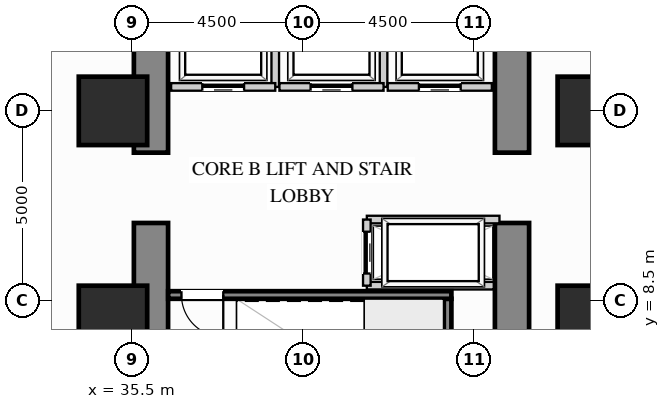
"""IFC4 building model, lengths in metres.
Left out: names, types, materials, properties, quantities, classifications, styles, units other than length and angle.
Written with IfcOpenShell. Run it as: python <this file> out.ifc"""

import sys

from ifc_helpers import new_model, si_unit, direction, frame, frame_2d, origin, origin_2d, place, context, subcontext, project, spatial, rectangle, extrude, source, transform, mapped, element, fill, save


model = new_model("IFC4")
c1 = context("Model", 3, precision=1e-05, world=origin(), true_north=direction((0.0, 1.0)))
c2 = subcontext(c1, "Body", "Model", "MODEL_VIEW")
j1 = project(units=[si_unit("LENGTHUNIT", "METRE"), si_unit("PLANEANGLEUNIT", "RADIAN")], contexts=[c1])
p1 = place(None, origin())
s1 = spatial("IfcSite", under=j1, at=p1, CompositionType="ELEMENT")
p2 = place(p1, origin())
s2 = spatial("IfcBuilding", under=s1, at=p2, CompositionType="ELEMENT")
p3 = place(p2, origin())
s3 = spatial("IfcBuildingStorey", under=s2, at=p3, CompositionType="ELEMENT", Elevation=0.0)
m1 = source(origin(), c2, "Body", "SweptSolid", [
    extrude(rectangle(XDim=1.8, YDim=1.8, at=origin_2d()), origin(), (0.0, 0.0, 1.0), 4.25),
])
for number, where, z_axis, x_axis in (
    (1, (47.6, 8.0, 0.0), (0.0, 0.0, 1.0), (1.0, 0.0, 0.0)),
    (2, (47.6, 13.5, 0.0), (0.0, 0.0, 1.0), (1.0, 0.0, 0.0)),
    (3, (35.0, 8.0, 0.0), (0.0, 0.0, 1.0), (1.0, 0.0, 0.0)),
    (4, (35.0, 13.5, 0.0), (0.0, 0.0, 1.0), (1.0, 0.0, 0.0)),
):
    element("IfcColumn", number, at=place(p3, frame(where, z_axis=z_axis, x_axis=x_axis)), inside=s3, PredefinedType="COLUMN", context=c2, shape_type="MappedRepresentation", body=[
        mapped(m1, transform((0.0, 0.0, 0.0), x_axis=(1.0, 0.0, 0.0), y_axis=(0.0, 1.0, 0.0), z_axis=(0.0, 0.0, 1.0))),
    ])
m2 = source(origin(), c2, "Body", "SweptSolid", [
    extrude(rectangle(XDim=5.6, YDim=0.9, at=frame_2d((2.8, 0.0))), origin(), (0.0, 0.0, 1.0), 4.25),
])
p4 = place(p3, frame((45.5, 4.95, 0.0), z_axis=(0.0, 0.0, 1.0), x_axis=(0.0, 1.0, 0.0)))
e5 = element("IfcWall", 5, at=p4, inside=s3, PredefinedType="SHEAR", context=c2, shape_type="MappedRepresentation", body=[
    mapped(m2, transform((0.0, 0.0, 0.0), x_axis=(1.0, 0.0, 0.0), y_axis=(0.0, 1.0, 0.0), z_axis=(0.0, 0.0, 1.0))),
])
m3 = source(origin(), c2, "Body", "SweptSolid", [
    extrude(rectangle(XDim=3.65, YDim=0.9, at=frame_2d((1.825, 0.0))), origin(), (0.0, 0.0, 1.0), 4.25),
])
p5 = place(p3, frame((45.5, 12.4, 0.0), z_axis=(0.0, 0.0, 1.0), x_axis=(0.0, 1.0, 0.0)))
e6 = element("IfcWall", 6, at=p5, inside=s3, PredefinedType="SHEAR", context=c2, shape_type="MappedRepresentation", body=[
    mapped(m3, transform((0.0, 0.0, 0.0), x_axis=(1.0, 0.0, 0.0), y_axis=(0.0, 1.0, 0.0), z_axis=(0.0, 0.0, 1.0))),
])
p6 = place(p3, frame((36.0, 4.95, 0.0), z_axis=(0.0, 0.0, 1.0), x_axis=(0.0, 1.0, 0.0)))
e7 = element("IfcWall", 7, at=p6, inside=s3, PredefinedType="SHEAR", context=c2, shape_type="MappedRepresentation", body=[
    mapped(m2, transform((0.0, 0.0, 0.0), x_axis=(1.0, 0.0, 0.0), y_axis=(0.0, 1.0, 0.0), z_axis=(0.0, 0.0, 1.0))),
])
p7 = place(p3, frame((36.0, 12.4, 0.0), z_axis=(0.0, 0.0, 1.0), x_axis=(0.0, 1.0, 0.0)))
e8 = element("IfcWall", 8, at=p7, inside=s3, PredefinedType="SHEAR", context=c2, shape_type="MappedRepresentation", body=[
    mapped(m3, transform((0.0, 0.0, 0.0), x_axis=(1.0, 0.0, 0.0), y_axis=(0.0, 1.0, 0.0), z_axis=(0.0, 0.0, 1.0))),
])
m4 = source(origin(), c2, "Body", "SweptSolid", [
    extrude(rectangle(XDim=1.89, YDim=0.2, at=frame_2d((0.945, 0.0))), origin(), (0.0, 0.0, 1.0), 4.235),
])
p8 = place(p3, frame((39.27, 14.13, 0.0), z_axis=(0.0, 0.0, 1.0), x_axis=(0.0, 1.0, 0.0)))
e9 = element("IfcWall", 9, at=p8, inside=s3, PredefinedType="PARTITIONING", context=c2, shape_type="MappedRepresentation", body=[
    mapped(m4, transform((0.0, 0.0, 0.0), x_axis=(1.0, 0.0, 0.0), y_axis=(0.0, 1.0, 0.0), z_axis=(0.0, 0.0, 1.0))),
])
p9 = place(p3, frame((36.53, 14.13, 0.0), z_axis=(0.0, 0.0, 1.0), x_axis=(1.0, 0.0, 0.0)))
e10 = element("IfcWall", 10, at=p9, inside=s3, PredefinedType="PARTITIONING", context=c2, shape_type="SweptSolid", body=[
    extrude(rectangle(XDim=2.74, YDim=0.2, at=frame_2d((1.37, 0.0))), origin(), (0.0, 0.0, 1.0), 4.235),
])
p10 = place(p9, frame((0.82, 0.0, 0.0)))
e11 = element("IfcOpeningElement", 11, at=p10, cuts=e10, PredefinedType="OPENING", context=c2, shape_type="SweptSolid", body=[
    extrude(rectangle(XDim=1.1, YDim=2.2, at=frame_2d((0.55, 1.1))), frame((0.0, 0.11, 0.0), z_axis=(0.0, -1.0, 0.0), x_axis=(1.0, 0.0, 0.0)), (0.0, 0.0, 1.0), 0.22),
])
p11 = place(p3, frame((42.12, 14.13, 0.0), z_axis=(0.0, 0.0, 1.0), x_axis=(0.0, 1.0, 0.0)))
e12 = element("IfcWall", 12, at=p11, inside=s3, PredefinedType="PARTITIONING", context=c2, shape_type="MappedRepresentation", body=[
    mapped(m4, transform((0.0, 0.0, 0.0), x_axis=(1.0, 0.0, 0.0), y_axis=(0.0, 1.0, 0.0), z_axis=(0.0, 0.0, 1.0))),
])
p12 = place(p3, frame((39.38, 14.13, 0.0), z_axis=(0.0, 0.0, 1.0), x_axis=(1.0, 0.0, 0.0)))
e13 = element("IfcWall", 13, at=p12, inside=s3, PredefinedType="PARTITIONING", context=c2, shape_type="SweptSolid", body=[
    extrude(rectangle(XDim=2.74, YDim=0.2, at=frame_2d((1.37, 0.0))), origin(), (0.0, 0.0, 1.0), 4.235),
])
p13 = place(p12, frame((0.82, 0.0, 0.0)))
e14 = element("IfcOpeningElement", 14, at=p13, cuts=e13, PredefinedType="OPENING", context=c2, shape_type="SweptSolid", body=[
    extrude(rectangle(XDim=1.1, YDim=2.2, at=frame_2d((0.55, 1.1))), frame((0.0, 0.11, 0.0), z_axis=(0.0, -1.0, 0.0), x_axis=(1.0, 0.0, 0.0)), (0.0, 0.0, 1.0), 0.22),
])
p14 = place(p3, frame((42.23, 14.13, 0.0), z_axis=(0.0, 0.0, 1.0), x_axis=(1.0, 0.0, 0.0)))
e15 = element("IfcWall", 15, at=p14, inside=s3, PredefinedType="PARTITIONING", context=c2, shape_type="SweptSolid", body=[
    extrude(rectangle(XDim=2.74, YDim=0.2, at=frame_2d((1.37, 0.0))), origin(), (0.0, 0.0, 1.0), 4.235),
])
p15 = place(p14, frame((0.82, 0.0, 0.0)))
e16 = element("IfcOpeningElement", 16, at=p15, cuts=e15, PredefinedType="OPENING", context=c2, shape_type="SweptSolid", body=[
    extrude(rectangle(XDim=1.1, YDim=2.2, at=frame_2d((0.55, 1.1))), frame((0.0, 0.11, 0.0), z_axis=(0.0, -1.0, 0.0), x_axis=(1.0, 0.0, 0.0)), (0.0, 0.0, 1.0), 0.22),
])
m5 = source(origin(), c2, "Body", "SweptSolid", [
    extrude(rectangle(XDim=3.49, YDim=0.2, at=frame_2d((1.745, 0.0))), origin(), (0.0, 0.0, 1.0), 4.235),
])
p16 = place(p3, frame((41.68, 10.64, 0.0), z_axis=(0.0, 0.0, 1.0), x_axis=(1.0, 0.0, 0.0)))
e17 = element("IfcWall", 17, at=p16, inside=s3, PredefinedType="PARTITIONING", context=c2, shape_type="MappedRepresentation", body=[
    mapped(m5, transform((0.0, 0.0, 0.0), x_axis=(1.0, 0.0, 0.0), y_axis=(0.0, 1.0, 0.0), z_axis=(0.0, 0.0, 1.0))),
])
m6 = source(origin(), c2, "Body", "SweptSolid", [
    extrude(rectangle(XDim=3.34, YDim=0.2, at=frame_2d((1.67, 0.0))), origin(), (0.0, 0.0, 1.0), 4.235),
])
p17 = place(p3, frame((41.68, 8.9, 0.0), z_axis=(0.0, 0.0, 1.0), x_axis=(1.0, 0.0, 0.0)))
e18 = element("IfcWall", 18, at=p17, inside=s3, PredefinedType="PARTITIONING", context=c2, shape_type="MappedRepresentation", body=[
    mapped(m6, transform((0.0, 0.0, 0.0), x_axis=(1.0, 0.0, 0.0), y_axis=(0.0, 1.0, 0.0), z_axis=(0.0, 0.0, 1.0))),
])
p18 = place(p3, frame((41.68, 8.9, 0.0), z_axis=(0.0, 0.0, 1.0), x_axis=(0.0, 1.0, 0.0)))
e19 = element("IfcWall", 19, at=p18, inside=s3, PredefinedType="PARTITIONING", context=c2, shape_type="SweptSolid", body=[
    extrude(rectangle(XDim=1.74, YDim=0.2, at=frame_2d((0.87, 0.0))), origin(), (0.0, 0.0, 1.0), 4.235),
])
p19 = place(p18, frame((0.32, 0.0, 0.0)))
e20 = element("IfcOpeningElement", 20, at=p19, cuts=e19, PredefinedType="OPENING", context=c2, shape_type="SweptSolid", body=[
    extrude(rectangle(XDim=1.1, YDim=2.2, at=frame_2d((0.55, 1.1))), frame((0.0, 0.11, 0.0), z_axis=(0.0, -1.0, 0.0), x_axis=(1.0, 0.0, 0.0)), (0.0, 0.0, 1.0), 0.22),
])
m7 = source(origin(), c2, "Body", "SweptSolid", [
    extrude(rectangle(XDim=3.603, YDim=0.2, at=frame_2d((1.802, 0.0))), origin(), (0.0, 0.0, 1.0), 4.25),
])
p20 = place(p3, frame((43.805, 4.952, 0.0), z_axis=(0.0, 0.0, 1.0), x_axis=(0.0, 1.0, 0.0)))
e21 = element("IfcWall", 21, at=p20, inside=s3, PredefinedType="SHEAR", context=c2, shape_type="MappedRepresentation", body=[
    mapped(m7, transform((0.0, 0.0, 0.0), x_axis=(1.0, 0.0, 0.0), y_axis=(0.0, 1.0, 0.0), z_axis=(0.0, 0.0, 1.0))),
])
p21 = place(p3, frame((36.452, 8.655, 0.0), z_axis=(0.0, 0.0, 1.0), x_axis=(1.0, 0.0, 0.0)))
e22 = element("IfcWall", 22, at=p21, inside=s3, PredefinedType="SHEAR", context=c2, shape_type="SweptSolid", body=[
    extrude(rectangle(XDim=7.453, YDim=0.2, at=frame_2d((3.727, 0.0))), origin(), (0.0, 0.0, 1.0), 4.25),
])
p22 = place(p21, frame((0.35, 0.0, 0.0)))
e23 = element("IfcOpeningElement", 23, at=p22, cuts=e22, PredefinedType="OPENING", context=c2, shape_type="SweptSolid", body=[
    extrude(rectangle(XDim=1.1, YDim=2.15, at=frame_2d((0.55, 1.075))), frame((0.0, 0.11, 0.0), z_axis=(0.0, -1.0, 0.0), x_axis=(1.0, 0.0, 0.0)), (0.0, 0.0, 1.0), 0.22),
])
m8 = source(origin(), c2, "Body", "SweptSolid", [
    extrude(rectangle(XDim=1.1, YDim=2.2, at=frame_2d((0.55, 1.1))), frame((0.0, 0.025, 0.0), z_axis=(0.0, -1.0, 0.0), x_axis=(1.0, 0.0, 0.0)), (0.0, 0.0, 1.0), 0.05),
])
p23 = place(p10, origin())
e24 = element("IfcDoor", 24, at=p23, inside=s3, OperationType="SLIDING_TO_LEFT", PredefinedType="DOOR", context=c2, shape_type="MappedRepresentation", body=[
    mapped(m8, transform((0.0, 0.0, 0.0), x_axis=(1.0, 0.0, 0.0), y_axis=(0.0, 1.0, 0.0), z_axis=(0.0, 0.0, 1.0))),
])
fill(e11, e24)
p24 = place(p13, origin())
e25 = element("IfcDoor", 25, at=p24, inside=s3, OperationType="SLIDING_TO_LEFT", PredefinedType="DOOR", context=c2, shape_type="MappedRepresentation", body=[
    mapped(m8, transform((0.0, 0.0, 0.0), x_axis=(1.0, 0.0, 0.0), y_axis=(0.0, 1.0, 0.0), z_axis=(0.0, 0.0, 1.0))),
])
fill(e14, e25)
p25 = place(p15, origin())
e26 = element("IfcDoor", 26, at=p25, inside=s3, OperationType="SLIDING_TO_LEFT", PredefinedType="DOOR", context=c2, shape_type="MappedRepresentation", body=[
    mapped(m8, transform((0.0, 0.0, 0.0), x_axis=(1.0, 0.0, 0.0), y_axis=(0.0, 1.0, 0.0), z_axis=(0.0, 0.0, 1.0))),
])
fill(e16, e26)
p26 = place(p19, origin())
e27 = element("IfcDoor", 27, at=p26, inside=s3, OperationType="SLIDING_TO_LEFT", PredefinedType="DOOR", context=c2, shape_type="MappedRepresentation", body=[
    mapped(m8, transform((0.0, 0.0, 0.0), x_axis=(1.0, 0.0, 0.0), y_axis=(0.0, 1.0, 0.0), z_axis=(0.0, 0.0, 1.0))),
])
fill(e20, e27)
m9 = source(origin(), c2, "Body", "SweptSolid", [
    extrude(rectangle(XDim=1.1, YDim=2.15, at=frame_2d((0.55, 1.075))), frame((0.0, 0.025, 0.0), z_axis=(0.0, -1.0, 0.0), x_axis=(1.0, 0.0, 0.0)), (0.0, 0.0, 1.0), 0.05),
])
p27 = place(p22, origin())
e28 = element("IfcDoor", 28, at=p27, inside=s3, OperationType="SINGLE_SWING_RIGHT", PredefinedType="DOOR", context=c2, shape_type="MappedRepresentation", body=[
    mapped(m9, transform((0.0, 0.0, 0.0), x_axis=(1.0, 0.0, 0.0), y_axis=(0.0, 1.0, 0.0), z_axis=(0.0, 0.0, 1.0))),
])
fill(e23, e28)
save(model, sys.argv[1])
